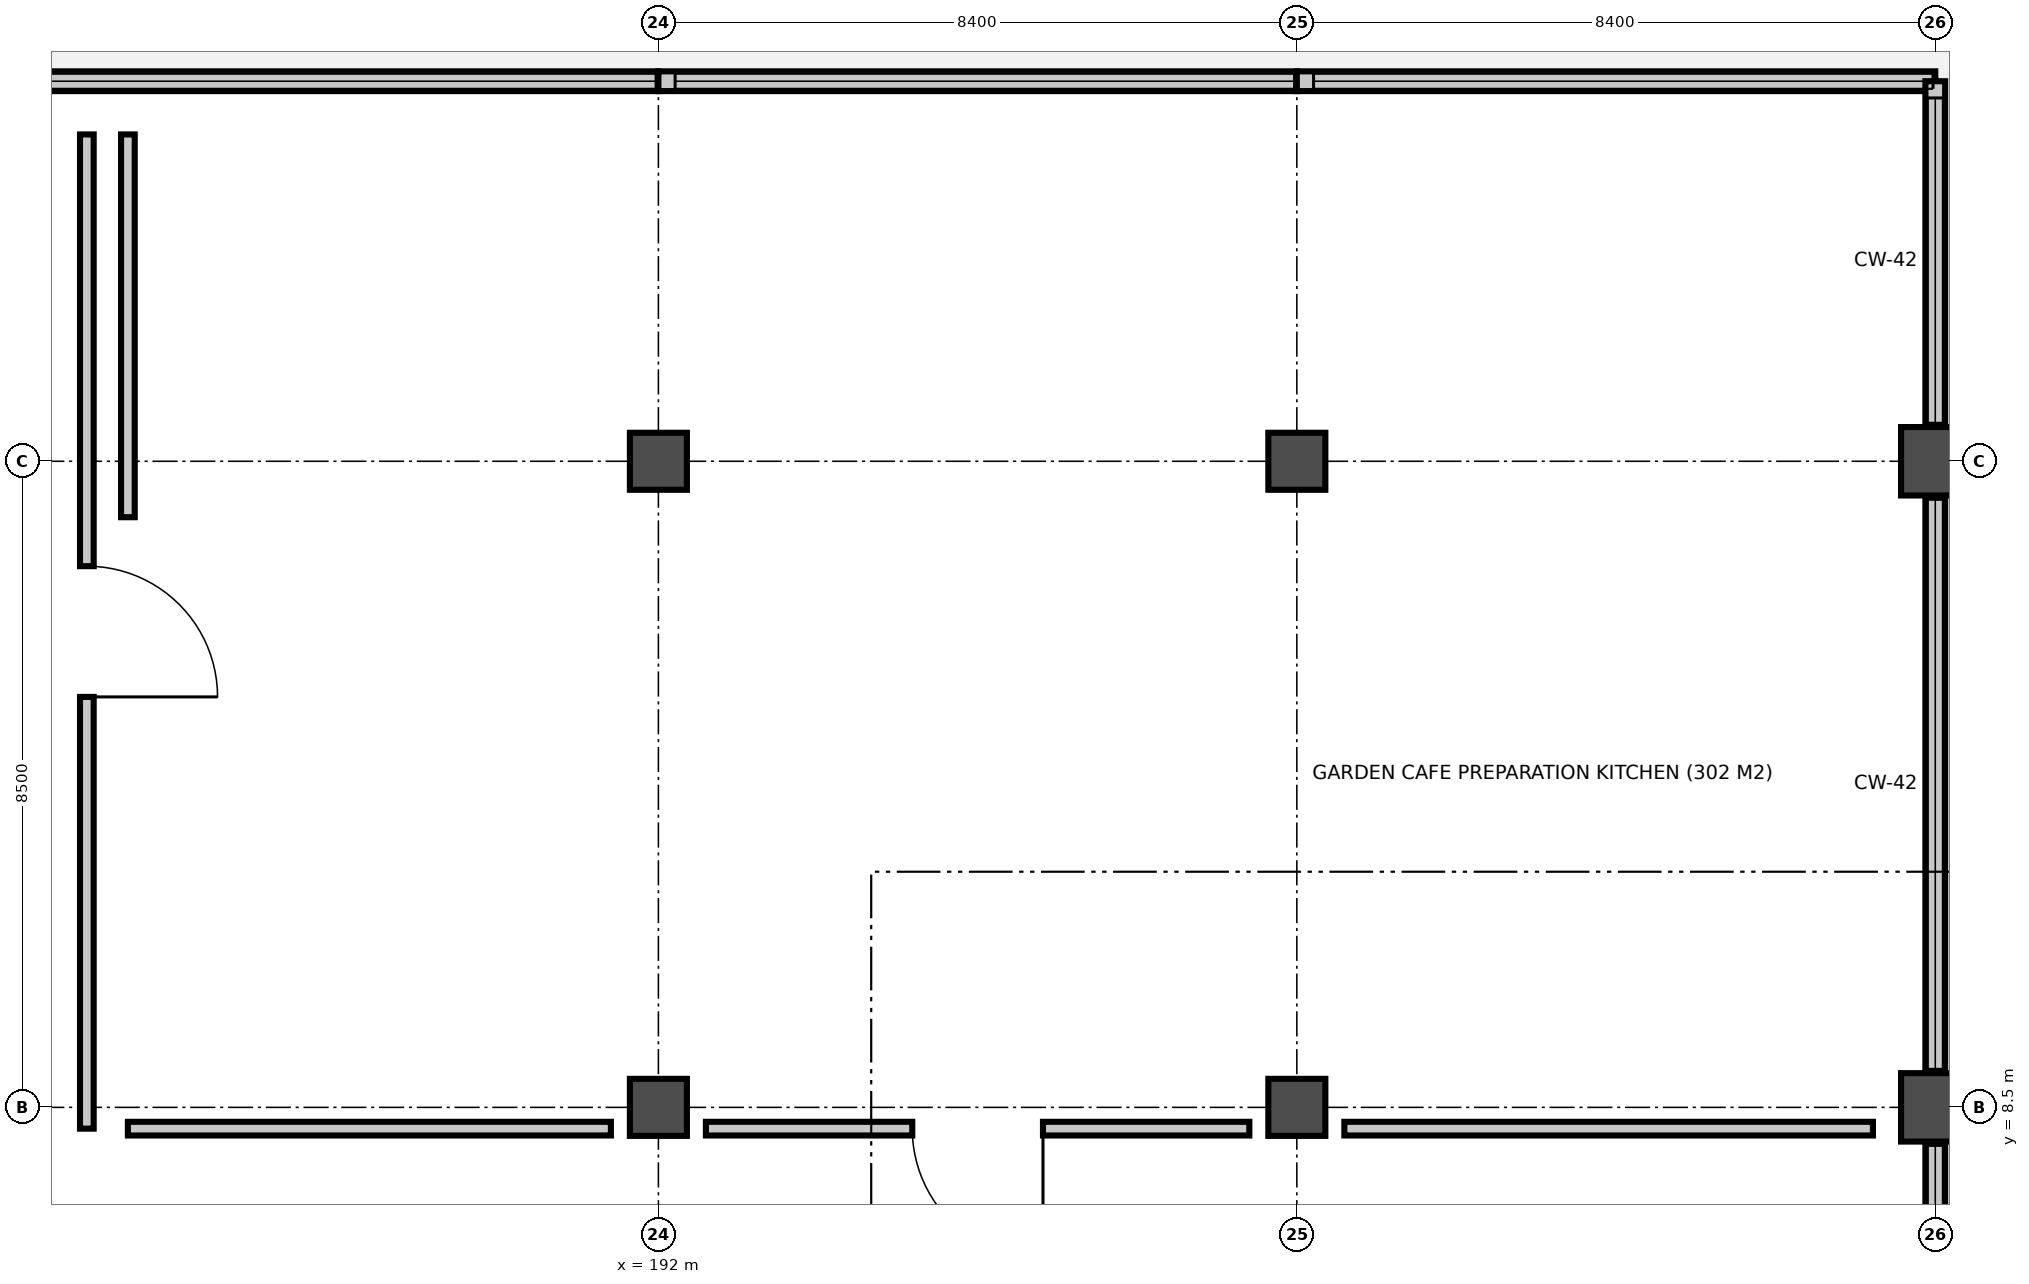
"""IFC4 building model, lengths in metres.
Left out: names, types, materials, properties, quantities, classifications, styles, units other than length and angle.
Written with IfcOpenShell. Run it as: python <this file> out.ifc"""

import sys

from ifc_helpers import new_model, si_unit, direction, frame, frame_2d, origin, origin_2d, place, context, subcontext, project, spatial, rectangle, circle, extrude, element, fill, save


model = new_model("IFC4")
c1 = context("Model", 3, precision=1e-05, world=origin(), true_north=direction((0.0, 1.0)))
c2 = subcontext(c1, "Body", "Model", "MODEL_VIEW")
j1 = project(units=[si_unit("LENGTHUNIT", "METRE"), si_unit("PLANEANGLEUNIT", "RADIAN")], contexts=[c1])
p1 = place(None, origin())
s1 = spatial("IfcSite", under=j1, at=p1, CompositionType="ELEMENT")
p2 = place(p1, origin())
s2 = spatial("IfcBuilding", under=s1, at=p2, CompositionType="ELEMENT")
p3 = place(p2, origin())
s3 = spatial("IfcBuildingStorey", under=s2, at=p3, CompositionType="ELEMENT", Elevation=0.0)
for number, where, z_axis, x_axis in (
    (1, (192.0, 8.5, 0.0), (0.0, 0.0, 1.0), (1.0, 0.0, 0.0)),
    (2, (192.0, 17.0, 0.0), (0.0, 0.0, 1.0), (1.0, 0.0, 0.0)),
    (3, (200.4, 8.5, 0.0), (0.0, 0.0, 1.0), (1.0, 0.0, 0.0)),
    (4, (200.4, 17.0, 0.0), (0.0, 0.0, 1.0), (1.0, 0.0, 0.0)),
):
    element("IfcColumn", number, at=place(p3, frame(where, z_axis=z_axis, x_axis=x_axis)), inside=s3, PredefinedType="COLUMN", context=c2, shape_type="SweptSolid", body=[
        extrude(rectangle(XDim=0.75, YDim=0.75, at=origin_2d()), origin(), (0.0, 0.0, 1.0), 5.4),
    ])
for number, where, z_axis, x_axis in (
    (5, (208.8, 8.5, 0.0), (0.0, 0.0, 1.0), (1.0, 0.0, 0.0)),
    (6, (208.8, 17.0, 0.0), (0.0, 0.0, 1.0), (1.0, 0.0, 0.0)),
):
    element("IfcColumn", number, at=place(p3, frame(where, z_axis=z_axis, x_axis=x_axis)), inside=s3, PredefinedType="COLUMN", context=c2, shape_type="SweptSolid", body=[
        extrude(circle(Radius=0.45, at=origin_2d()), origin(), (0.0, 0.0, 1.0), 5.4),
    ])
for number, where, z_axis, x_axis in (
    (7, (183.6, 22.0, 0.0), (0.0, 0.0, 1.0), (1.0, 0.0, 0.0)),
    (8, (192.0, 22.0, 0.0), (0.0, 0.0, 1.0), (1.0, 0.0, 0.0)),
):
    element("IfcWall", number, at=place(p3, frame(where, z_axis=z_axis, x_axis=x_axis)), inside=s3, PredefinedType="PARAPET", context=c2, shape_type="SweptSolid", body=[
        extrude(rectangle(XDim=8.4, YDim=0.26, at=frame_2d((4.2, 0.0))), origin(), (0.0, 0.0, 1.0), 1.12),
    ])
p4 = place(p3, frame((200.4, 22.0, 0.0), z_axis=(0.0, 0.0, 1.0), x_axis=(1.0, 0.0, 0.0)))
e9 = element("IfcWall", 9, at=p4, inside=s3, PredefinedType="PARAPET", context=c2, shape_type="SweptSolid", body=[
    extrude(rectangle(XDim=8.4, YDim=0.26, at=frame_2d((4.2, 0.0))), origin(), (0.0, 0.0, 1.0), 1.12),
])
for number, where, z_axis, x_axis in (
    (10, (208.8, 8.03, 0.0), (0.0, 0.0, 1.0), (0.0, -1.0, 0.0)),
    (11, (208.8, 16.53, 0.0), (0.0, 0.0, 1.0), (0.0, -1.0, 0.0)),
):
    element("IfcWall", number, at=place(p3, frame(where, z_axis=z_axis, x_axis=x_axis)), inside=s3, PredefinedType="PARAPET", context=c2, shape_type="SweptSolid", body=[
        extrude(rectangle(XDim=7.56, YDim=0.26, at=frame_2d((3.78, 0.0))), origin(), (0.0, 0.0, 1.0), 1.12),
    ])
p5 = place(p3, frame((208.8, 22.0, 0.0), z_axis=(0.0, 0.0, 1.0), x_axis=(0.0, -1.0, 0.0)))
e12 = element("IfcWall", 12, at=p5, inside=s3, PredefinedType="PARAPET", context=c2, shape_type="SweptSolid", body=[
    extrude(rectangle(XDim=4.53, YDim=0.26, at=frame_2d((2.265, 0.0))), origin(), (0.0, 0.0, 1.0), 1.12),
])
p6 = place(p3, frame((184.48, 21.3, 0.0), z_axis=(0.0, 0.0, 1.0), x_axis=(0.0, -1.0, 0.0)))
e13 = element("IfcWall", 13, at=p6, inside=s3, PredefinedType="PARTITIONING", context=c2, shape_type="SweptSolid", body=[
    extrude(rectangle(XDim=13.08, YDim=0.18, at=frame_2d((6.54, 0.0))), origin(), (0.0, 0.0, 1.0), 4.04),
])
p7 = place(p6, frame((5.68, 0.0, 0.0)))
e14 = element("IfcOpeningElement", 14, at=p7, cuts=e13, PredefinedType="OPENING", context=c2, shape_type="SweptSolid", body=[
    extrude(rectangle(XDim=1.72, YDim=2.36, at=frame_2d((0.86, 1.18))), frame((0.0, 0.1, 0.0), z_axis=(0.0, -1.0, 0.0), x_axis=(1.0, 0.0, 0.0)), (0.0, 0.0, 1.0), 0.2),
])
p8 = place(p3, frame((207.98, 8.22, 0.0), z_axis=(0.0, 0.0, 1.0), x_axis=(-1.0, 0.0, 0.0)))
e15 = element("IfcWall", 15, at=p8, inside=s3, PredefinedType="PARTITIONING", context=c2, shape_type="SweptSolid", body=[
    extrude(rectangle(XDim=6.955, YDim=0.18, at=frame_2d((3.478, 0.0))), origin(), (0.0, 0.0, 1.0), 4.04),
])
p9 = place(p3, frame((199.775, 8.22, 0.0), z_axis=(0.0, 0.0, 1.0), x_axis=(-1.0, 0.0, 0.0)))
e16 = element("IfcWall", 16, at=p9, inside=s3, PredefinedType="PARTITIONING", context=c2, shape_type="SweptSolid", body=[
    extrude(rectangle(XDim=7.15, YDim=0.18, at=frame_2d((3.575, 0.0))), origin(), (0.0, 0.0, 1.0), 4.04),
])
p10 = place(p9, frame((2.715, 0.0, 0.0)))
e17 = element("IfcOpeningElement", 17, at=p10, cuts=e16, PredefinedType="OPENING", context=c2, shape_type="SweptSolid", body=[
    extrude(rectangle(XDim=1.72, YDim=2.36, at=frame_2d((0.86, 1.18))), frame((0.0, 0.1, 0.0), z_axis=(0.0, -1.0, 0.0), x_axis=(1.0, 0.0, 0.0)), (0.0, 0.0, 1.0), 0.2),
])
p11 = place(p3, frame((191.375, 8.22, 0.0), z_axis=(0.0, 0.0, 1.0), x_axis=(-1.0, 0.0, 0.0)))
e18 = element("IfcWall", 18, at=p11, inside=s3, PredefinedType="PARTITIONING", context=c2, shape_type="SweptSolid", body=[
    extrude(rectangle(XDim=6.355, YDim=0.18, at=frame_2d((3.177, 0.0))), origin(), (0.0, 0.0, 1.0), 4.04),
])
p12 = place(p3, frame((185.02, 16.264, 0.0), z_axis=(0.0, 0.0, 1.0), x_axis=(0.0, 1.0, 0.0)))
e19 = element("IfcWall", 19, at=p12, inside=s3, PredefinedType="PARTITIONING", context=c2, shape_type="SweptSolid", body=[
    extrude(rectangle(XDim=5.036, YDim=0.18, at=frame_2d((2.518, 0.0))), origin(), (0.0, 0.0, 1.0), 4.04),
])
p13 = place(p7, origin())
e20 = element("IfcDoor", 20, at=p13, inside=s3, OperationType="SINGLE_SWING_RIGHT", PredefinedType="DOOR", context=c2, shape_type="SweptSolid", body=[
    extrude(rectangle(XDim=1.72, YDim=2.36, at=frame_2d((0.86, 1.18))), frame((0.0, 0.025, 0.0), z_axis=(0.0, -1.0, 0.0), x_axis=(1.0, 0.0, 0.0)), (0.0, 0.0, 1.0), 0.05),
])
fill(e14, e20)
p14 = place(p10, origin())
e21 = element("IfcDoor", 21, at=p14, inside=s3, OperationType="SINGLE_SWING_LEFT", PredefinedType="DOOR", context=c2, shape_type="SweptSolid", body=[
    extrude(rectangle(XDim=1.72, YDim=2.36, at=frame_2d((0.86, 1.18))), frame((0.0, 0.025, 0.0), z_axis=(0.0, -1.0, 0.0), x_axis=(1.0, 0.0, 0.0)), (0.0, 0.0, 1.0), 0.05),
])
fill(e17, e21)
save(model, sys.argv[1])
